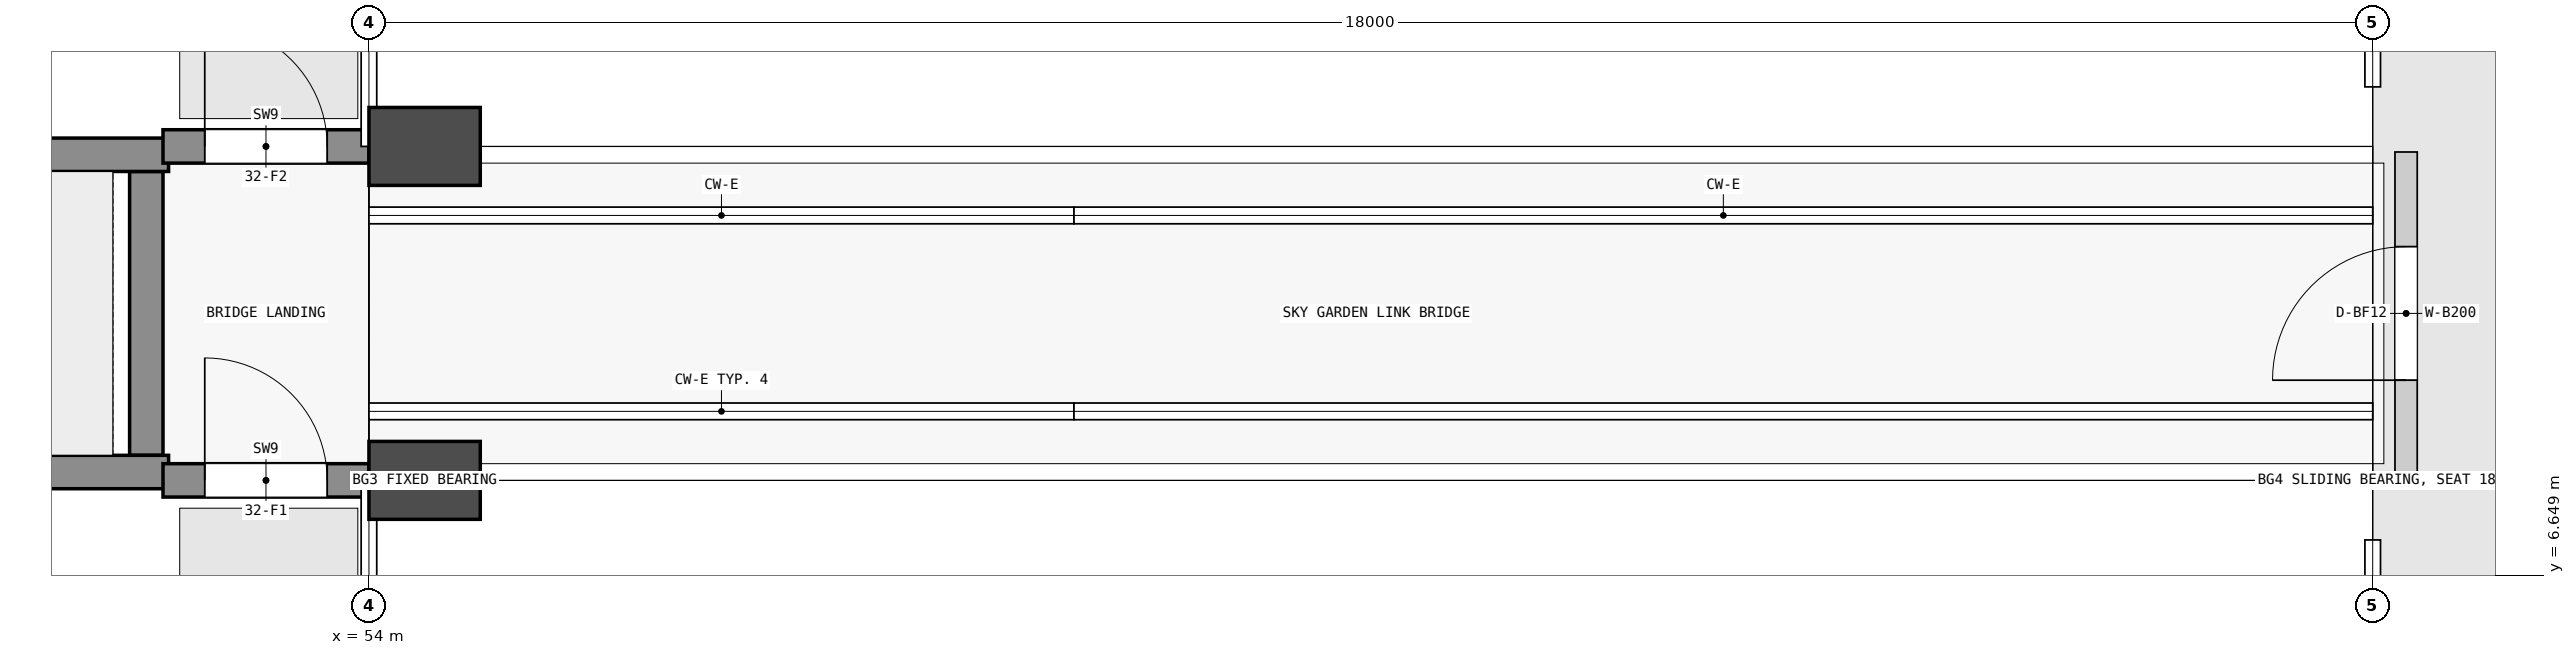
"""IFC4 building model, lengths in metres.
Left out: names, types, materials, properties, quantities, classifications, styles, units other than length and angle.
Written with IfcOpenShell. Run it as: python <this file> out.ifc"""

import sys

from ifc_helpers import new_model, si_unit, direction, frame, frame_2d, origin, place, context, subcontext, project, spatial, rectangle, extrude, element, fill, save


model = new_model("IFC4")
c1 = context("Model", 3, precision=1e-05, world=origin(), true_north=direction((0.0, 1.0)))
c2 = subcontext(c1, "Body", "Model", "MODEL_VIEW")
j1 = project(units=[si_unit("LENGTHUNIT", "METRE"), si_unit("PLANEANGLEUNIT", "RADIAN")], contexts=[c1])
p1 = place(None, origin())
s1 = spatial("IfcSite", under=j1, at=p1, CompositionType="ELEMENT")
p2 = place(p1, origin())
s2 = spatial("IfcBuilding", under=s1, at=p2, CompositionType="ELEMENT")
p3 = place(p2, frame((0.0, 0.0, 123.8)))
s3 = spatial("IfcBuildingStorey", under=s2, at=p3, CompositionType="ELEMENT", Elevation=123.8)
p4 = place(p3, frame((52.0, 7.725, 0.0), z_axis=(0.0, 0.0, 1.0), x_axis=(0.0, 1.0, 0.0)))
e1 = element("IfcWall", 1, at=p4, inside=s3, PredefinedType="SHEAR", context=c2, shape_type="SweptSolid", body=[
    extrude(rectangle(XDim=2.55, YDim=0.3, at=frame_2d((1.275, 0.0))), origin(), (0.0, 0.0, 1.0), 4.8),
])
for number, where, z_axis, x_axis in (
    (2, (45.0, 7.575, 0.0), (0.0, 0.0, 1.0), (1.0, 0.0, 0.0)),
    (3, (45.0, 10.425, 0.0), (0.0, 0.0, 1.0), (1.0, 0.0, 0.0)),
):
    element("IfcWall", number, at=place(p3, frame(where, z_axis=z_axis, x_axis=x_axis)), inside=s3, PredefinedType="SHEAR", context=c2, shape_type="SweptSolid", body=[
        extrude(rectangle(XDim=7.2, YDim=0.3, at=frame_2d((3.6, 0.0))), origin(), (0.0, 0.0, 1.0), 4.8),
    ])
p5 = place(p3, frame((52.15, 7.5, -1.55), z_axis=(0.0, 0.0, 1.0), x_axis=(1.0, 0.0, 0.0)))
e4 = element("IfcWall", 4, at=p5, inside=s3, PredefinedType="SHEAR", context=c2, shape_type="SweptSolid", body=[
    extrude(rectangle(XDim=1.85, YDim=0.3, at=frame_2d((0.925, 0.0))), origin(), (0.0, 0.0, 1.0), 6.05),
])
p6 = place(p5, frame((0.375, 0.0, 1.55)))
e5 = element("IfcOpeningElement", 5, at=p6, cuts=e4, PredefinedType="OPENING", context=c2, shape_type="SweptSolid", body=[
    extrude(rectangle(XDim=1.1, YDim=2.1, at=frame_2d((0.55, 1.05))), frame((0.0, 0.16, 0.0), z_axis=(0.0, -1.0, 0.0), x_axis=(1.0, 0.0, 0.0)), (0.0, 0.0, 1.0), 0.32),
])
p7 = place(p3, frame((52.15, 10.5, -1.55), z_axis=(0.0, 0.0, 1.0), x_axis=(1.0, 0.0, 0.0)))
e6 = element("IfcWall", 6, at=p7, inside=s3, PredefinedType="SHEAR", context=c2, shape_type="SweptSolid", body=[
    extrude(rectangle(XDim=1.85, YDim=0.3, at=frame_2d((0.925, 0.0))), origin(), (0.0, 0.0, 1.0), 6.05),
])
p8 = place(p7, frame((0.375, 0.0, 1.55)))
e7 = element("IfcOpeningElement", 7, at=p8, cuts=e6, PredefinedType="OPENING", context=c2, shape_type="SweptSolid", body=[
    extrude(rectangle(XDim=1.1, YDim=2.1, at=frame_2d((0.55, 1.05))), frame((0.0, 0.16, 0.0), z_axis=(0.0, -1.0, 0.0), x_axis=(1.0, 0.0, 0.0)), (0.0, 0.0, 1.0), 0.32),
])
p9 = place(p3, frame((72.3, 7.55, 0.0), z_axis=(0.0, 0.0, 1.0), x_axis=(0.0, 1.0, 0.0)))
e8 = element("IfcWall", 8, at=p9, inside=s3, PredefinedType="PARTITIONING", context=c2, shape_type="SweptSolid", body=[
    extrude(rectangle(XDim=2.9, YDim=0.2, at=frame_2d((1.45, 0.0))), origin(), (0.0, 0.0, 1.0), 4.5),
])
p10 = place(p9, frame((0.85, 0.0, 0.0)))
e9 = element("IfcOpeningElement", 9, at=p10, cuts=e8, PredefinedType="OPENING", context=c2, shape_type="SweptSolid", body=[
    extrude(rectangle(XDim=1.2, YDim=2.1, at=frame_2d((0.6, 1.05))), frame((0.0, 0.11, 0.0), z_axis=(0.0, -1.0, 0.0), x_axis=(1.0, 0.0, 0.0)), (0.0, 0.0, 1.0), 0.22),
])
p11 = place(p6, origin())
e10 = element("IfcDoor", 10, at=p11, inside=s3, OperationType="SINGLE_SWING_LEFT", PredefinedType="DOOR", context=c2, shape_type="SweptSolid", body=[
    extrude(rectangle(XDim=1.1, YDim=2.1, at=frame_2d((0.55, 1.05))), frame((0.0, 0.025, 0.0), z_axis=(0.0, -1.0, 0.0), x_axis=(1.0, 0.0, 0.0)), (0.0, 0.0, 1.0), 0.05),
])
fill(e5, e10)
p12 = place(p8, origin())
e11 = element("IfcDoor", 11, at=p12, inside=s3, OperationType="SINGLE_SWING_LEFT", PredefinedType="DOOR", context=c2, shape_type="SweptSolid", body=[
    extrude(rectangle(XDim=1.1, YDim=2.1, at=frame_2d((0.55, 1.05))), frame((0.0, 0.025, 0.0), z_axis=(0.0, -1.0, 0.0), x_axis=(1.0, 0.0, 0.0)), (0.0, 0.0, 1.0), 0.05),
])
fill(e7, e11)
p13 = place(p10, origin())
e12 = element("IfcDoor", 12, at=p13, inside=s3, OperationType="SINGLE_SWING_LEFT", PredefinedType="DOOR", context=c2, shape_type="SweptSolid", body=[
    extrude(rectangle(XDim=1.2, YDim=2.1, at=frame_2d((0.6, 1.05))), frame((0.0, 0.025, 0.0), z_axis=(0.0, -1.0, 0.0), x_axis=(1.0, 0.0, 0.0)), (0.0, 0.0, 1.0), 0.05),
])
fill(e9, e12)
save(model, sys.argv[1])
